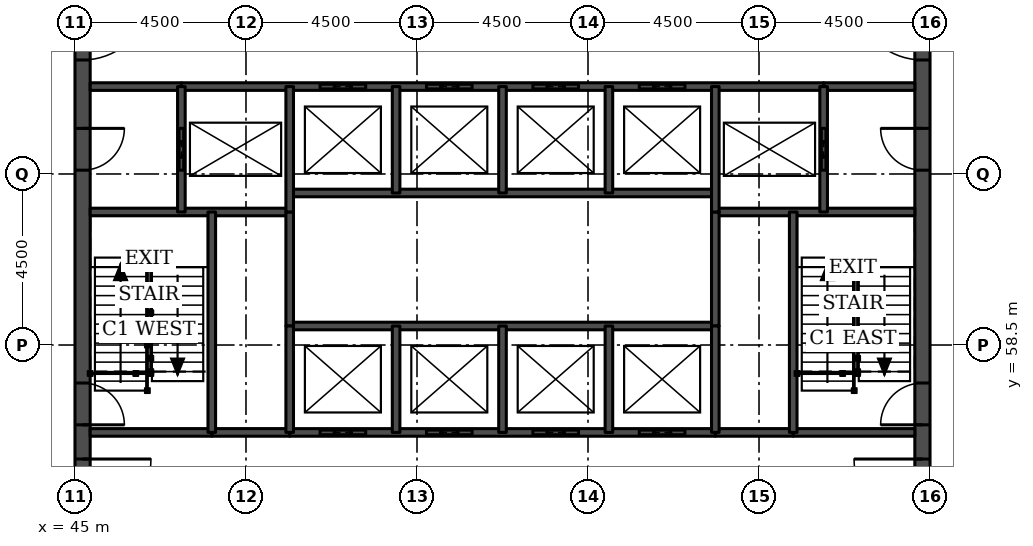
"""IFC4 building model, lengths in metres.
Left out: names, types, materials, properties, quantities, classifications, styles, units other than length and angle.
Written with IfcOpenShell. Run it as: python <this file> out.ifc"""

import sys

from ifc_helpers import new_model, si_unit, direction, frame, frame_2d, origin, place, context, subcontext, project, spatial, rectangle, extrude, element, fill, save


model = new_model("IFC4")
c1 = context("Model", 3, precision=1e-05, world=origin(), true_north=direction((0.0, 1.0)))
c2 = subcontext(c1, "Body", "Model", "MODEL_VIEW")
j1 = project(units=[si_unit("LENGTHUNIT", "METRE"), si_unit("PLANEANGLEUNIT", "RADIAN")], contexts=[c1])
p1 = place(None, origin())
s1 = spatial("IfcSite", under=j1, at=p1, CompositionType="ELEMENT")
p2 = place(p1, origin())
s2 = spatial("IfcBuilding", under=s1, at=p2, CompositionType="ELEMENT")
p3 = place(p2, frame((0.0, 0.0, 158.8)))
s3 = spatial("IfcBuildingStorey", under=s2, at=p3, CompositionType="ELEMENT", Elevation=158.8)
p4 = place(p3, frame((45.2, 49.5, 0.0), z_axis=(0.0, 0.0, 1.0), x_axis=(0.0, 1.0, 0.0)))
e1 = element("IfcWall", 1, at=p4, inside=s3, PredefinedType="SHEAR", context=c2, shape_type="SweptSolid", body=[
    extrude(rectangle(XDim=22.5, YDim=0.4, at=frame_2d((11.25, 0.0))), origin(), (0.0, 0.0, 1.0), 3.7),
])
p5 = place(p4, frame((4.2, 0.0, 0.0)))
e2 = element("IfcOpeningElement", 2, at=p5, cuts=e1, PredefinedType="OPENING", context=c2, shape_type="SweptSolid", body=[
    extrude(rectangle(XDim=1.8, YDim=2.1, at=frame_2d((0.9, 1.05))), frame((0.0, 0.21, 0.0), z_axis=(0.0, -1.0, 0.0), x_axis=(1.0, 0.0, 0.0)), (0.0, 0.0, 1.0), 0.42),
])
p6 = place(p4, frame((6.9, 0.0, 0.0)))
e3 = element("IfcOpeningElement", 3, at=p6, cuts=e1, PredefinedType="OPENING", context=c2, shape_type="SweptSolid", body=[
    extrude(rectangle(XDim=1.1, YDim=2.1, at=frame_2d((0.55, 1.05))), frame((0.0, 0.21, 0.0), z_axis=(0.0, -1.0, 0.0), x_axis=(1.0, 0.0, 0.0)), (0.0, 0.0, 1.0), 0.42),
])
p7 = place(p4, frame((13.6, 0.0, 0.0)))
e4 = element("IfcOpeningElement", 4, at=p7, cuts=e1, PredefinedType="OPENING", context=c2, shape_type="SweptSolid", body=[
    extrude(rectangle(XDim=1.1, YDim=2.1, at=frame_2d((0.55, 1.05))), frame((0.0, 0.21, 0.0), z_axis=(0.0, -1.0, 0.0), x_axis=(1.0, 0.0, 0.0)), (0.0, 0.0, 1.0), 0.42),
])
p8 = place(p4, frame((16.5, 0.0, 0.0)))
e5 = element("IfcOpeningElement", 5, at=p8, cuts=e1, PredefinedType="OPENING", context=c2, shape_type="SweptSolid", body=[
    extrude(rectangle(XDim=1.8, YDim=2.1, at=frame_2d((0.9, 1.05))), frame((0.0, 0.21, 0.0), z_axis=(0.0, -1.0, 0.0), x_axis=(1.0, 0.0, 0.0)), (0.0, 0.0, 1.0), 0.42),
])
p9 = place(p3, frame((67.3, 49.5, 0.0), z_axis=(0.0, 0.0, 1.0), x_axis=(0.0, 1.0, 0.0)))
e6 = element("IfcWall", 6, at=p9, inside=s3, PredefinedType="SHEAR", context=c2, shape_type="SweptSolid", body=[
    extrude(rectangle(XDim=22.5, YDim=0.4, at=frame_2d((11.25, 0.0))), origin(), (0.0, 0.0, 1.0), 3.7),
])
p10 = place(p9, frame((4.2, 0.0, 0.0)))
e7 = element("IfcOpeningElement", 7, at=p10, cuts=e6, PredefinedType="OPENING", context=c2, shape_type="SweptSolid", body=[
    extrude(rectangle(XDim=1.8, YDim=2.1, at=frame_2d((0.9, 1.05))), frame((0.0, 0.21, 0.0), z_axis=(0.0, -1.0, 0.0), x_axis=(1.0, 0.0, 0.0)), (0.0, 0.0, 1.0), 0.42),
])
p11 = place(p9, frame((6.9, 0.0, 0.0)))
e8 = element("IfcOpeningElement", 8, at=p11, cuts=e6, PredefinedType="OPENING", context=c2, shape_type="SweptSolid", body=[
    extrude(rectangle(XDim=1.1, YDim=2.1, at=frame_2d((0.55, 1.05))), frame((0.0, 0.21, 0.0), z_axis=(0.0, -1.0, 0.0), x_axis=(1.0, 0.0, 0.0)), (0.0, 0.0, 1.0), 0.42),
])
p12 = place(p9, frame((13.6, 0.0, 0.0)))
e9 = element("IfcOpeningElement", 9, at=p12, cuts=e6, PredefinedType="OPENING", context=c2, shape_type="SweptSolid", body=[
    extrude(rectangle(XDim=1.1, YDim=2.1, at=frame_2d((0.55, 1.05))), frame((0.0, 0.21, 0.0), z_axis=(0.0, -1.0, 0.0), x_axis=(1.0, 0.0, 0.0)), (0.0, 0.0, 1.0), 0.42),
])
p13 = place(p9, frame((16.5, 0.0, 0.0)))
e10 = element("IfcOpeningElement", 10, at=p13, cuts=e6, PredefinedType="OPENING", context=c2, shape_type="SweptSolid", body=[
    extrude(rectangle(XDim=1.8, YDim=2.1, at=frame_2d((0.9, 1.05))), frame((0.0, 0.21, 0.0), z_axis=(0.0, -1.0, 0.0), x_axis=(1.0, 0.0, 0.0)), (0.0, 0.0, 1.0), 0.42),
])
for number, where, z_axis, x_axis in (
    (11, (48.6, 56.2, 0.0), (0.0, 0.0, 1.0), (1.0, 0.0, 0.0)),
    (12, (61.85, 56.2, 0.0), (0.0, 0.0, 1.0), (1.0, 0.0, 0.0)),
):
    element("IfcWall", number, at=place(p3, frame(where, z_axis=z_axis, x_axis=x_axis)), inside=s3, PredefinedType="SOLIDWALL", context=c2, shape_type="SweptSolid", body=[
        extrude(rectangle(XDim=2.05, YDim=0.2, at=frame_2d((1.025, 0.0))), origin(), (0.0, 0.0, 1.0), 3.55),
    ])
p14 = place(p3, frame((45.4, 56.2, 0.0), z_axis=(0.0, 0.0, 1.0), x_axis=(1.0, 0.0, 0.0)))
e13 = element("IfcWall", 13, at=p14, inside=s3, PredefinedType="SOLIDWALL", context=c2, shape_type="SweptSolid", body=[
    extrude(rectangle(XDim=3.2, YDim=0.2, at=frame_2d((1.6, 0.0))), origin(), (0.0, 0.0, 1.0), 3.55),
])
p15 = place(p3, frame((50.65, 56.2, 0.0), z_axis=(0.0, 0.0, 1.0), x_axis=(1.0, 0.0, 0.0)))
e14 = element("IfcWall", 14, at=p15, inside=s3, PredefinedType="SOLIDWALL", context=c2, shape_type="SweptSolid", body=[
    extrude(rectangle(XDim=11.2, YDim=0.2, at=frame_2d((5.6, 0.0))), origin(), (0.0, 0.0, 1.0), 3.55),
])
p16 = place(p15, frame((0.8, 0.0, 0.0)))
e15 = element("IfcOpeningElement", 15, at=p16, cuts=e14, PredefinedType="OPENING", context=c2, shape_type="SweptSolid", body=[
    extrude(rectangle(XDim=1.2, YDim=2.1, at=frame_2d((0.6, 1.05))), frame((0.0, 0.11, 0.0), z_axis=(0.0, -1.0, 0.0), x_axis=(1.0, 0.0, 0.0)), (0.0, 0.0, 1.0), 0.22),
])
p17 = place(p15, frame((3.6, 0.0, 0.0)))
e16 = element("IfcOpeningElement", 16, at=p17, cuts=e14, PredefinedType="OPENING", context=c2, shape_type="SweptSolid", body=[
    extrude(rectangle(XDim=1.2, YDim=2.1, at=frame_2d((0.6, 1.05))), frame((0.0, 0.11, 0.0), z_axis=(0.0, -1.0, 0.0), x_axis=(1.0, 0.0, 0.0)), (0.0, 0.0, 1.0), 0.22),
])
p18 = place(p15, frame((6.4, 0.0, 0.0)))
e17 = element("IfcOpeningElement", 17, at=p18, cuts=e14, PredefinedType="OPENING", context=c2, shape_type="SweptSolid", body=[
    extrude(rectangle(XDim=1.2, YDim=2.1, at=frame_2d((0.6, 1.05))), frame((0.0, 0.11, 0.0), z_axis=(0.0, -1.0, 0.0), x_axis=(1.0, 0.0, 0.0)), (0.0, 0.0, 1.0), 0.22),
])
p19 = place(p15, frame((9.2, 0.0, 0.0)))
e18 = element("IfcOpeningElement", 18, at=p19, cuts=e14, PredefinedType="OPENING", context=c2, shape_type="SweptSolid", body=[
    extrude(rectangle(XDim=1.2, YDim=2.1, at=frame_2d((0.6, 1.05))), frame((0.0, 0.11, 0.0), z_axis=(0.0, -1.0, 0.0), x_axis=(1.0, 0.0, 0.0)), (0.0, 0.0, 1.0), 0.22),
])
p20 = place(p3, frame((63.9, 56.2, 0.0), z_axis=(0.0, 0.0, 1.0), x_axis=(1.0, 0.0, 0.0)))
e19 = element("IfcWall", 19, at=p20, inside=s3, PredefinedType="SOLIDWALL", context=c2, shape_type="SweptSolid", body=[
    extrude(rectangle(XDim=3.2, YDim=0.2, at=frame_2d((1.6, 0.0))), origin(), (0.0, 0.0, 1.0), 3.55),
])
p21 = place(p3, frame((50.65, 59.0, 0.0), z_axis=(0.0, 0.0, 1.0), x_axis=(1.0, 0.0, 0.0)))
e20 = element("IfcWall", 20, at=p21, inside=s3, PredefinedType="SOLIDWALL", context=c2, shape_type="SweptSolid", body=[
    extrude(rectangle(XDim=11.2, YDim=0.2, at=frame_2d((5.6, 0.0))), origin(), (0.0, 0.0, 1.0), 3.7),
])
for number, where, z_axis, x_axis in (
    (21, (45.4, 62.0, 0.0), (0.0, 0.0, 1.0), (1.0, 0.0, 0.0)),
    (22, (61.85, 62.0, 0.0), (0.0, 0.0, 1.0), (1.0, 0.0, 0.0)),
):
    element("IfcWall", number, at=place(p3, frame(where, z_axis=z_axis, x_axis=x_axis)), inside=s3, PredefinedType="SOLIDWALL", context=c2, shape_type="SweptSolid", body=[
        extrude(rectangle(XDim=5.25, YDim=0.2, at=frame_2d((2.625, 0.0))), origin(), (0.0, 0.0, 1.0), 3.55),
    ])
p22 = place(p3, frame((50.65, 62.5, 0.0), z_axis=(0.0, 0.0, 1.0), x_axis=(1.0, 0.0, 0.0)))
e23 = element("IfcWall", 23, at=p22, inside=s3, PredefinedType="SOLIDWALL", context=c2, shape_type="SweptSolid", body=[
    extrude(rectangle(XDim=11.2, YDim=0.2, at=frame_2d((5.6, 0.0))), origin(), (0.0, 0.0, 1.0), 3.7),
])
for number, where, z_axis, x_axis in (
    (24, (45.4, 65.3, 0.0), (0.0, 0.0, 1.0), (1.0, 0.0, 0.0)),
    (25, (64.7, 65.3, 0.0), (0.0, 0.0, 1.0), (1.0, 0.0, 0.0)),
):
    element("IfcWall", number, at=place(p3, frame(where, z_axis=z_axis, x_axis=x_axis)), inside=s3, PredefinedType="SOLIDWALL", context=c2, shape_type="SweptSolid", body=[
        extrude(rectangle(XDim=2.4, YDim=0.2, at=frame_2d((1.2, 0.0))), origin(), (0.0, 0.0, 1.0), 3.55),
    ])
p23 = place(p3, frame((47.8, 65.3, 0.0), z_axis=(0.0, 0.0, 1.0), x_axis=(1.0, 0.0, 0.0)))
e26 = element("IfcWall", 26, at=p23, inside=s3, PredefinedType="SOLIDWALL", context=c2, shape_type="SweptSolid", body=[
    extrude(rectangle(XDim=16.9, YDim=0.2, at=frame_2d((8.45, 0.0))), origin(), (0.0, 0.0, 1.0), 3.55),
])
p24 = place(p23, frame((3.65, 0.0, 0.0)))
e27 = element("IfcOpeningElement", 27, at=p24, cuts=e26, PredefinedType="OPENING", context=c2, shape_type="SweptSolid", body=[
    extrude(rectangle(XDim=1.2, YDim=2.1, at=frame_2d((0.6, 1.05))), frame((0.0, 0.11, 0.0), z_axis=(0.0, -1.0, 0.0), x_axis=(1.0, 0.0, 0.0)), (0.0, 0.0, 1.0), 0.22),
])
p25 = place(p23, frame((6.45, 0.0, 0.0)))
e28 = element("IfcOpeningElement", 28, at=p25, cuts=e26, PredefinedType="OPENING", context=c2, shape_type="SweptSolid", body=[
    extrude(rectangle(XDim=1.2, YDim=2.1, at=frame_2d((0.6, 1.05))), frame((0.0, 0.11, 0.0), z_axis=(0.0, -1.0, 0.0), x_axis=(1.0, 0.0, 0.0)), (0.0, 0.0, 1.0), 0.22),
])
p26 = place(p23, frame((9.25, 0.0, 0.0)))
e29 = element("IfcOpeningElement", 29, at=p26, cuts=e26, PredefinedType="OPENING", context=c2, shape_type="SweptSolid", body=[
    extrude(rectangle(XDim=1.2, YDim=2.1, at=frame_2d((0.6, 1.05))), frame((0.0, 0.11, 0.0), z_axis=(0.0, -1.0, 0.0), x_axis=(1.0, 0.0, 0.0)), (0.0, 0.0, 1.0), 0.22),
])
p27 = place(p23, frame((12.05, 0.0, 0.0)))
e30 = element("IfcOpeningElement", 30, at=p27, cuts=e26, PredefinedType="OPENING", context=c2, shape_type="SweptSolid", body=[
    extrude(rectangle(XDim=1.2, YDim=2.1, at=frame_2d((0.6, 1.05))), frame((0.0, 0.11, 0.0), z_axis=(0.0, -1.0, 0.0), x_axis=(1.0, 0.0, 0.0)), (0.0, 0.0, 1.0), 0.22),
])
p28 = place(p3, frame((47.8, 62.0, 0.0), z_axis=(0.0, 0.0, 1.0), x_axis=(0.0, 1.0, 0.0)))
e31 = element("IfcWall", 31, at=p28, inside=s3, PredefinedType="SOLIDWALL", context=c2, shape_type="SweptSolid", body=[
    extrude(rectangle(XDim=3.3, YDim=0.2, at=frame_2d((1.65, 0.0))), origin(), (0.0, 0.0, 1.0), 3.55),
])
p29 = place(p28, frame((1.1, 0.0, 0.0)))
e32 = element("IfcOpeningElement", 32, at=p29, cuts=e31, PredefinedType="OPENING", context=c2, shape_type="SweptSolid", body=[
    extrude(rectangle(XDim=1.1, YDim=2.1, at=frame_2d((0.55, 1.05))), frame((0.0, 0.11, 0.0), z_axis=(0.0, -1.0, 0.0), x_axis=(1.0, 0.0, 0.0)), (0.0, 0.0, 1.0), 0.22),
])
p30 = place(p3, frame((48.6, 56.2, 0.0), z_axis=(0.0, 0.0, 1.0), x_axis=(0.0, 1.0, 0.0)))
e33 = element("IfcWall", 33, at=p30, inside=s3, PredefinedType="SOLIDWALL", context=c2, shape_type="SweptSolid", body=[
    extrude(rectangle(XDim=5.8, YDim=0.2, at=frame_2d((2.9, 0.0))), origin(), (0.0, 0.0, 1.0), 3.55),
])
p31 = place(p3, frame((50.65, 59.0, 0.0), z_axis=(0.0, 0.0, 1.0), x_axis=(0.0, 1.0, 0.0)))
e34 = element("IfcWall", 34, at=p31, inside=s3, PredefinedType="SOLIDWALL", context=c2, shape_type="SweptSolid", body=[
    extrude(rectangle(XDim=3.0, YDim=0.2, at=frame_2d((1.5, 0.0))), origin(), (0.0, 0.0, 1.0), 3.7),
])
p32 = place(p3, frame((50.65, 56.2, 0.0), z_axis=(0.0, 0.0, 1.0), x_axis=(0.0, 1.0, 0.0)))
e35 = element("IfcWall", 35, at=p32, inside=s3, PredefinedType="SOLIDWALL", context=c2, shape_type="SweptSolid", body=[
    extrude(rectangle(XDim=2.8, YDim=0.2, at=frame_2d((1.4, 0.0))), origin(), (0.0, 0.0, 1.0), 3.55),
])
p33 = place(p3, frame((50.65, 62.0, 0.0), z_axis=(0.0, 0.0, 1.0), x_axis=(0.0, 1.0, 0.0)))
e36 = element("IfcWall", 36, at=p33, inside=s3, PredefinedType="SOLIDWALL", context=c2, shape_type="SweptSolid", body=[
    extrude(rectangle(XDim=3.3, YDim=0.2, at=frame_2d((1.65, 0.0))), origin(), (0.0, 0.0, 1.0), 3.55),
])
for number, where, z_axis, x_axis in (
    (37, (53.45, 56.2, 0.0), (0.0, 0.0, 1.0), (0.0, 1.0, 0.0)),
    (38, (53.45, 62.5, 0.0), (0.0, 0.0, 1.0), (0.0, 1.0, 0.0)),
    (39, (56.25, 56.2, 0.0), (0.0, 0.0, 1.0), (0.0, 1.0, 0.0)),
    (40, (56.25, 62.5, 0.0), (0.0, 0.0, 1.0), (0.0, 1.0, 0.0)),
    (41, (59.05, 56.2, 0.0), (0.0, 0.0, 1.0), (0.0, 1.0, 0.0)),
    (42, (59.05, 62.5, 0.0), (0.0, 0.0, 1.0), (0.0, 1.0, 0.0)),
):
    element("IfcWall", number, at=place(p3, frame(where, z_axis=z_axis, x_axis=x_axis)), inside=s3, PredefinedType="SOLIDWALL", context=c2, shape_type="SweptSolid", body=[
        extrude(rectangle(XDim=2.8, YDim=0.2, at=frame_2d((1.4, 0.0))), origin(), (0.0, 0.0, 1.0), 3.55),
    ])
p34 = place(p3, frame((61.85, 59.0, 0.0), z_axis=(0.0, 0.0, 1.0), x_axis=(0.0, 1.0, 0.0)))
e43 = element("IfcWall", 43, at=p34, inside=s3, PredefinedType="SOLIDWALL", context=c2, shape_type="SweptSolid", body=[
    extrude(rectangle(XDim=3.0, YDim=0.2, at=frame_2d((1.5, 0.0))), origin(), (0.0, 0.0, 1.0), 3.7),
])
p35 = place(p3, frame((61.85, 56.2, 0.0), z_axis=(0.0, 0.0, 1.0), x_axis=(0.0, 1.0, 0.0)))
e44 = element("IfcWall", 44, at=p35, inside=s3, PredefinedType="SOLIDWALL", context=c2, shape_type="SweptSolid", body=[
    extrude(rectangle(XDim=2.8, YDim=0.2, at=frame_2d((1.4, 0.0))), origin(), (0.0, 0.0, 1.0), 3.55),
])
p36 = place(p3, frame((61.85, 62.0, 0.0), z_axis=(0.0, 0.0, 1.0), x_axis=(0.0, 1.0, 0.0)))
e45 = element("IfcWall", 45, at=p36, inside=s3, PredefinedType="SOLIDWALL", context=c2, shape_type="SweptSolid", body=[
    extrude(rectangle(XDim=3.3, YDim=0.2, at=frame_2d((1.65, 0.0))), origin(), (0.0, 0.0, 1.0), 3.55),
])
p37 = place(p3, frame((63.9, 56.2, 0.0), z_axis=(0.0, 0.0, 1.0), x_axis=(0.0, 1.0, 0.0)))
e46 = element("IfcWall", 46, at=p37, inside=s3, PredefinedType="SOLIDWALL", context=c2, shape_type="SweptSolid", body=[
    extrude(rectangle(XDim=5.8, YDim=0.2, at=frame_2d((2.9, 0.0))), origin(), (0.0, 0.0, 1.0), 3.55),
])
p38 = place(p3, frame((64.7, 62.0, 0.0), z_axis=(0.0, 0.0, 1.0), x_axis=(0.0, 1.0, 0.0)))
e47 = element("IfcWall", 47, at=p38, inside=s3, PredefinedType="SOLIDWALL", context=c2, shape_type="SweptSolid", body=[
    extrude(rectangle(XDim=3.3, YDim=0.2, at=frame_2d((1.65, 0.0))), origin(), (0.0, 0.0, 1.0), 3.55),
])
p39 = place(p38, frame((1.1, 0.0, 0.0)))
e48 = element("IfcOpeningElement", 48, at=p39, cuts=e47, PredefinedType="OPENING", context=c2, shape_type="SweptSolid", body=[
    extrude(rectangle(XDim=1.1, YDim=2.1, at=frame_2d((0.55, 1.05))), frame((0.0, 0.11, 0.0), z_axis=(0.0, -1.0, 0.0), x_axis=(1.0, 0.0, 0.0)), (0.0, 0.0, 1.0), 0.22),
])
p40 = place(p16, origin())
e49 = element("IfcDoor", 49, at=p40, inside=s3, OperationType="DOUBLE_DOOR_SLIDING", PredefinedType="DOOR", context=c2, shape_type="SweptSolid", body=[
    extrude(rectangle(XDim=1.2, YDim=2.1, at=frame_2d((0.6, 1.05))), frame((0.0, 0.025, 0.0), z_axis=(0.0, -1.0, 0.0), x_axis=(1.0, 0.0, 0.0)), (0.0, 0.0, 1.0), 0.05),
])
fill(e15, e49)
p41 = place(p17, origin())
e50 = element("IfcDoor", 50, at=p41, inside=s3, OperationType="DOUBLE_DOOR_SLIDING", PredefinedType="DOOR", context=c2, shape_type="SweptSolid", body=[
    extrude(rectangle(XDim=1.2, YDim=2.1, at=frame_2d((0.6, 1.05))), frame((0.0, 0.025, 0.0), z_axis=(0.0, -1.0, 0.0), x_axis=(1.0, 0.0, 0.0)), (0.0, 0.0, 1.0), 0.05),
])
fill(e16, e50)
p42 = place(p18, origin())
e51 = element("IfcDoor", 51, at=p42, inside=s3, OperationType="DOUBLE_DOOR_SLIDING", PredefinedType="DOOR", context=c2, shape_type="SweptSolid", body=[
    extrude(rectangle(XDim=1.2, YDim=2.1, at=frame_2d((0.6, 1.05))), frame((0.0, 0.025, 0.0), z_axis=(0.0, -1.0, 0.0), x_axis=(1.0, 0.0, 0.0)), (0.0, 0.0, 1.0), 0.05),
])
fill(e17, e51)
p43 = place(p19, origin())
e52 = element("IfcDoor", 52, at=p43, inside=s3, OperationType="DOUBLE_DOOR_SLIDING", PredefinedType="DOOR", context=c2, shape_type="SweptSolid", body=[
    extrude(rectangle(XDim=1.2, YDim=2.1, at=frame_2d((0.6, 1.05))), frame((0.0, 0.025, 0.0), z_axis=(0.0, -1.0, 0.0), x_axis=(1.0, 0.0, 0.0)), (0.0, 0.0, 1.0), 0.05),
])
fill(e18, e52)
p44 = place(p24, origin())
e53 = element("IfcDoor", 53, at=p44, inside=s3, OperationType="DOUBLE_DOOR_SLIDING", PredefinedType="DOOR", context=c2, shape_type="SweptSolid", body=[
    extrude(rectangle(XDim=1.2, YDim=2.1, at=frame_2d((0.6, 1.05))), frame((0.0, 0.025, 0.0), z_axis=(0.0, -1.0, 0.0), x_axis=(1.0, 0.0, 0.0)), (0.0, 0.0, 1.0), 0.05),
])
fill(e27, e53)
p45 = place(p25, origin())
e54 = element("IfcDoor", 54, at=p45, inside=s3, OperationType="DOUBLE_DOOR_SLIDING", PredefinedType="DOOR", context=c2, shape_type="SweptSolid", body=[
    extrude(rectangle(XDim=1.2, YDim=2.1, at=frame_2d((0.6, 1.05))), frame((0.0, 0.025, 0.0), z_axis=(0.0, -1.0, 0.0), x_axis=(1.0, 0.0, 0.0)), (0.0, 0.0, 1.0), 0.05),
])
fill(e28, e54)
p46 = place(p26, origin())
e55 = element("IfcDoor", 55, at=p46, inside=s3, OperationType="DOUBLE_DOOR_SLIDING", PredefinedType="DOOR", context=c2, shape_type="SweptSolid", body=[
    extrude(rectangle(XDim=1.2, YDim=2.1, at=frame_2d((0.6, 1.05))), frame((0.0, 0.025, 0.0), z_axis=(0.0, -1.0, 0.0), x_axis=(1.0, 0.0, 0.0)), (0.0, 0.0, 1.0), 0.05),
])
fill(e29, e55)
p47 = place(p27, origin())
e56 = element("IfcDoor", 56, at=p47, inside=s3, OperationType="DOUBLE_DOOR_SLIDING", PredefinedType="DOOR", context=c2, shape_type="SweptSolid", body=[
    extrude(rectangle(XDim=1.2, YDim=2.1, at=frame_2d((0.6, 1.05))), frame((0.0, 0.025, 0.0), z_axis=(0.0, -1.0, 0.0), x_axis=(1.0, 0.0, 0.0)), (0.0, 0.0, 1.0), 0.05),
])
fill(e30, e56)
p48 = place(p29, origin())
e57 = element("IfcDoor", 57, at=p48, inside=s3, OperationType="DOUBLE_DOOR_SLIDING", PredefinedType="DOOR", context=c2, shape_type="SweptSolid", body=[
    extrude(rectangle(XDim=1.1, YDim=2.1, at=frame_2d((0.55, 1.05))), frame((0.0, 0.025, 0.0), z_axis=(0.0, -1.0, 0.0), x_axis=(1.0, 0.0, 0.0)), (0.0, 0.0, 1.0), 0.05),
])
fill(e32, e57)
p49 = place(p39, origin())
e58 = element("IfcDoor", 58, at=p49, inside=s3, OperationType="DOUBLE_DOOR_SLIDING", PredefinedType="DOOR", context=c2, shape_type="SweptSolid", body=[
    extrude(rectangle(XDim=1.1, YDim=2.1, at=frame_2d((0.55, 1.05))), frame((0.0, 0.025, 0.0), z_axis=(0.0, -1.0, 0.0), x_axis=(1.0, 0.0, 0.0)), (0.0, 0.0, 1.0), 0.05),
])
fill(e48, e58)
p50 = place(p5, frame((1.8, 0.0, 0.0), z_axis=(0.0, 0.0, 1.0), x_axis=(-1.0, 0.0, 0.0)))
e59 = element("IfcDoor", 59, at=p50, inside=s3, OperationType="SINGLE_SWING_LEFT", PredefinedType="DOOR", context=c2, shape_type="SweptSolid", body=[
    extrude(rectangle(XDim=1.8, YDim=2.1, at=frame_2d((0.9, 1.05))), frame((0.0, 0.025, 0.0), z_axis=(0.0, -1.0, 0.0), x_axis=(1.0, 0.0, 0.0)), (0.0, 0.0, 1.0), 0.05),
])
fill(e2, e59)
p51 = place(p6, frame((1.1, 0.0, 0.0), z_axis=(0.0, 0.0, 1.0), x_axis=(-1.0, 0.0, 0.0)))
e60 = element("IfcDoor", 60, at=p51, inside=s3, OperationType="SINGLE_SWING_RIGHT", PredefinedType="DOOR", context=c2, shape_type="SweptSolid", body=[
    extrude(rectangle(XDim=1.1, YDim=2.1, at=frame_2d((0.55, 1.05))), frame((0.0, 0.025, 0.0), z_axis=(0.0, -1.0, 0.0), x_axis=(1.0, 0.0, 0.0)), (0.0, 0.0, 1.0), 0.05),
])
fill(e3, e60)
p52 = place(p7, frame((1.1, 0.0, 0.0), z_axis=(0.0, 0.0, 1.0), x_axis=(-1.0, 0.0, 0.0)))
e61 = element("IfcDoor", 61, at=p52, inside=s3, OperationType="SINGLE_SWING_LEFT", PredefinedType="DOOR", context=c2, shape_type="SweptSolid", body=[
    extrude(rectangle(XDim=1.1, YDim=2.1, at=frame_2d((0.55, 1.05))), frame((0.0, 0.025, 0.0), z_axis=(0.0, -1.0, 0.0), x_axis=(1.0, 0.0, 0.0)), (0.0, 0.0, 1.0), 0.05),
])
fill(e4, e61)
p53 = place(p8, frame((1.8, 0.0, 0.0), z_axis=(0.0, 0.0, 1.0), x_axis=(-1.0, 0.0, 0.0)))
e62 = element("IfcDoor", 62, at=p53, inside=s3, OperationType="SINGLE_SWING_LEFT", PredefinedType="DOOR", context=c2, shape_type="SweptSolid", body=[
    extrude(rectangle(XDim=1.8, YDim=2.1, at=frame_2d((0.9, 1.05))), frame((0.0, 0.025, 0.0), z_axis=(0.0, -1.0, 0.0), x_axis=(1.0, 0.0, 0.0)), (0.0, 0.0, 1.0), 0.05),
])
fill(e5, e62)
p54 = place(p10, origin())
e63 = element("IfcDoor", 63, at=p54, inside=s3, OperationType="SINGLE_SWING_RIGHT", PredefinedType="DOOR", context=c2, shape_type="SweptSolid", body=[
    extrude(rectangle(XDim=1.8, YDim=2.1, at=frame_2d((0.9, 1.05))), frame((0.0, 0.025, 0.0), z_axis=(0.0, -1.0, 0.0), x_axis=(1.0, 0.0, 0.0)), (0.0, 0.0, 1.0), 0.05),
])
fill(e7, e63)
p55 = place(p11, origin())
e64 = element("IfcDoor", 64, at=p55, inside=s3, OperationType="SINGLE_SWING_LEFT", PredefinedType="DOOR", context=c2, shape_type="SweptSolid", body=[
    extrude(rectangle(XDim=1.1, YDim=2.1, at=frame_2d((0.55, 1.05))), frame((0.0, 0.025, 0.0), z_axis=(0.0, -1.0, 0.0), x_axis=(1.0, 0.0, 0.0)), (0.0, 0.0, 1.0), 0.05),
])
fill(e8, e64)
p56 = place(p12, origin())
e65 = element("IfcDoor", 65, at=p56, inside=s3, OperationType="SINGLE_SWING_RIGHT", PredefinedType="DOOR", context=c2, shape_type="SweptSolid", body=[
    extrude(rectangle(XDim=1.1, YDim=2.1, at=frame_2d((0.55, 1.05))), frame((0.0, 0.025, 0.0), z_axis=(0.0, -1.0, 0.0), x_axis=(1.0, 0.0, 0.0)), (0.0, 0.0, 1.0), 0.05),
])
fill(e9, e65)
p57 = place(p13, origin())
e66 = element("IfcDoor", 66, at=p57, inside=s3, OperationType="SINGLE_SWING_RIGHT", PredefinedType="DOOR", context=c2, shape_type="SweptSolid", body=[
    extrude(rectangle(XDim=1.8, YDim=2.1, at=frame_2d((0.9, 1.05))), frame((0.0, 0.025, 0.0), z_axis=(0.0, -1.0, 0.0), x_axis=(1.0, 0.0, 0.0)), (0.0, 0.0, 1.0), 0.05),
])
fill(e10, e66)
save(model, sys.argv[1])
